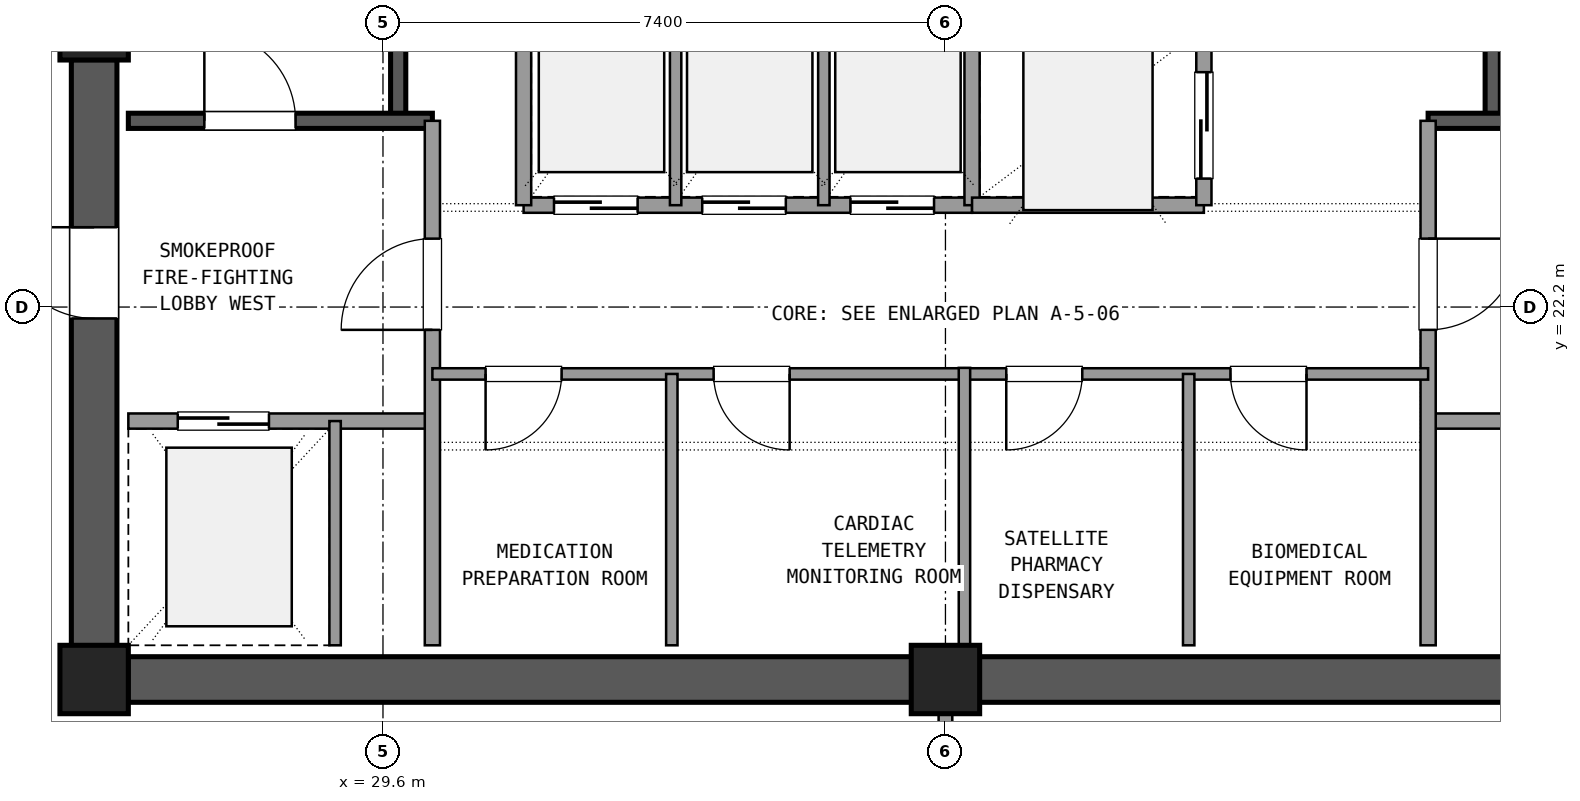
"""IFC4 building model, lengths in metres.
Left out: names, types, materials, properties, quantities, classifications, styles, units other than length and angle.
Written with IfcOpenShell. Run it as: python <this file> out.ifc"""

import sys

from ifc_helpers import new_model, si_unit, direction, frame, frame_2d, origin, origin_2d, place, context, subcontext, project, spatial, rectangle, extrude, element, fill, save


model = new_model("IFC4")
c1 = context("Model", 3, precision=1e-05, world=origin(), true_north=direction((0.0, 1.0)))
c2 = subcontext(c1, "Body", "Model", "MODEL_VIEW")
j1 = project(units=[si_unit("LENGTHUNIT", "METRE"), si_unit("PLANEANGLEUNIT", "RADIAN")], contexts=[c1])
p1 = place(None, origin())
s1 = spatial("IfcSite", under=j1, at=p1, CompositionType="ELEMENT")
p2 = place(p1, origin())
s2 = spatial("IfcBuilding", under=s1, at=p2, CompositionType="ELEMENT")
p3 = place(p2, frame((0.0, 0.0, 203.58)))
s3 = spatial("IfcBuildingStorey", under=s2, at=p3, CompositionType="ELEMENT", Elevation=203.58)
for number, where, z_axis, x_axis in (
    (1, (25.8, 17.3, 0.0), (0.0, 0.0, 1.0), (1.0, 0.0, 0.0)),
    (2, (37.0, 17.3, 0.0), (0.0, 0.0, 1.0), (1.0, 0.0, 0.0)),
    (3, (25.8, 25.9, 0.0), (0.0, 0.0, 1.0), (1.0, 0.0, 0.0)),
):
    element("IfcColumn", number, at=place(p3, frame(where, z_axis=z_axis, x_axis=x_axis)), inside=s3, PredefinedType="COLUMN", context=c2, shape_type="SweptSolid", body=[
        extrude(rectangle(XDim=0.9, YDim=0.9, at=origin_2d()), origin(), (0.0, 0.0, 1.0), 3.6),
    ])
for number, where, z_axis, x_axis in (
    (4, (26.245, 17.3, 0.0), (0.0, 0.0, 1.0), (1.0, 0.0, 0.0)),
    (5, (37.445, 17.3, 0.0), (0.0, 0.0, 1.0), (1.0, 0.0, 0.0)),
):
    element("IfcWall", number, at=place(p3, frame(where, z_axis=z_axis, x_axis=x_axis)), inside=s3, PredefinedType="SHEAR", context=c2, shape_type="SweptSolid", body=[
        extrude(rectangle(XDim=10.31, YDim=0.6, at=frame_2d((5.155, 0.0))), origin(), (0.0, 0.0, 1.0), 3.32),
    ])
p4 = place(p3, frame((25.8, 25.455, 0.0), z_axis=(0.0, 0.0, 1.0), x_axis=(0.0, -1.0, 0.0)))
e6 = element("IfcWall", 6, at=p4, inside=s3, PredefinedType="SHEAR", context=c2, shape_type="SweptSolid", body=[
    extrude(rectangle(XDim=7.71, YDim=0.6, at=frame_2d((3.855, 0.0))), origin(), (0.0, 0.0, 1.0), 3.32),
])
p5 = place(p4, frame((2.205, 0.0, 0.0)))
e7 = element("IfcOpeningElement", 7, at=p5, cuts=e6, PredefinedType="OPENING", context=c2, shape_type="SweptSolid", body=[
    extrude(rectangle(XDim=1.2, YDim=2.15, at=frame_2d((0.6, 1.075))), frame((0.0, 0.31, 0.0), z_axis=(0.0, -1.0, 0.0), x_axis=(1.0, 0.0, 0.0)), (0.0, 0.0, 1.0), 0.62),
])
p6 = place(p3, frame((29.8, 24.65, 0.0), z_axis=(0.0, 0.0, 1.0), x_axis=(0.0, 1.0, 0.0)))
e8 = element("IfcWall", 8, at=p6, inside=s3, PredefinedType="SHEAR", context=c2, shape_type="SweptSolid", body=[
    extrude(rectangle(XDim=9.4, YDim=0.2, at=frame_2d((4.7, 0.0))), origin(), (0.0, 0.0, 1.0), 3.32),
])
p7 = place(p3, frame((26.25, 24.65, 0.0), z_axis=(0.0, 0.0, 1.0), x_axis=(1.0, 0.0, 0.0)))
e9 = element("IfcWall", 9, at=p7, inside=s3, PredefinedType="SHEAR", context=c2, shape_type="SweptSolid", body=[
    extrude(rectangle(XDim=4.0, YDim=0.2, at=frame_2d((2.0, 0.0))), origin(), (0.0, 0.0, 1.0), 3.32),
])
p8 = place(p7, frame((1.0, 0.0, 0.0)))
e10 = element("IfcOpeningElement", 10, at=p8, cuts=e9, PredefinedType="OPENING", context=c2, shape_type="SweptSolid", body=[
    extrude(rectangle(XDim=1.2, YDim=2.15, at=frame_2d((0.6, 1.075))), frame((0.0, 0.11, 0.0), z_axis=(0.0, -1.0, 0.0), x_axis=(1.0, 0.0, 0.0)), (0.0, 0.0, 1.0), 0.22),
])
p9 = place(p3, frame((44.2, 24.65, 0.0), z_axis=(0.0, 0.0, 1.0), x_axis=(0.0, 1.0, 0.0)))
e11 = element("IfcWall", 11, at=p9, inside=s3, PredefinedType="SHEAR", context=c2, shape_type="SweptSolid", body=[
    extrude(rectangle(XDim=9.4, YDim=0.2, at=frame_2d((4.7, 0.0))), origin(), (0.0, 0.0, 1.0), 3.32),
])
p10 = place(p3, frame((43.35, 24.65, 0.0), z_axis=(0.0, 0.0, 1.0), x_axis=(1.0, 0.0, 0.0)))
e12 = element("IfcWall", 12, at=p10, inside=s3, PredefinedType="SHEAR", context=c2, shape_type="SweptSolid", body=[
    extrude(rectangle(XDim=4.4, YDim=0.2, at=frame_2d((2.2, 0.0))), origin(), (0.0, 0.0, 1.0), 3.32),
])
p11 = place(p10, frame((2.0, 0.0, 0.0)))
e13 = element("IfcOpeningElement", 13, at=p11, cuts=e12, PredefinedType="OPENING", context=c2, shape_type="SweptSolid", body=[
    extrude(rectangle(XDim=1.2, YDim=2.15, at=frame_2d((0.6, 1.075))), frame((0.0, 0.11, 0.0), z_axis=(0.0, -1.0, 0.0), x_axis=(1.0, 0.0, 0.0)), (0.0, 0.0, 1.0), 0.22),
])
p12 = place(p3, frame((26.25, 20.7, 0.0), z_axis=(0.0, 0.0, 1.0), x_axis=(1.0, 0.0, 0.0)))
e14 = element("IfcWall", 14, at=p12, inside=s3, PredefinedType="SOLIDWALL", context=c2, shape_type="SweptSolid", body=[
    extrude(rectangle(XDim=4.0, YDim=0.2, at=frame_2d((2.0, 0.0))), origin(), (0.0, 0.0, 1.0), 2.61),
])
p13 = place(p12, frame((0.65, 0.0, 0.0)))
e15 = element("IfcOpeningElement", 15, at=p13, cuts=e14, PredefinedType="OPENING", context=c2, shape_type="SweptSolid", body=[
    extrude(rectangle(XDim=1.2, YDim=2.15, at=frame_2d((0.6, 1.075))), frame((0.0, 0.11, 0.0), z_axis=(0.0, -1.0, 0.0), x_axis=(1.0, 0.0, 0.0)), (0.0, 0.0, 1.0), 0.22),
])
p14 = place(p3, frame((30.25, 17.75, 0.0), z_axis=(0.0, 0.0, 1.0), x_axis=(0.0, 1.0, 0.0)))
e16 = element("IfcWall", 16, at=p14, inside=s3, PredefinedType="SOLIDWALL", context=c2, shape_type="SweptSolid", body=[
    extrude(rectangle(XDim=6.9, YDim=0.2, at=frame_2d((3.45, 0.0))), origin(), (0.0, 0.0, 1.0), 2.61),
])
p15 = place(p14, frame((4.15, 0.0, 0.0)))
e17 = element("IfcOpeningElement", 17, at=p15, cuts=e16, PredefinedType="OPENING", context=c2, shape_type="SweptSolid", body=[
    extrude(rectangle(XDim=1.2, YDim=2.15, at=frame_2d((0.6, 1.075))), frame((0.0, 0.11, 0.0), z_axis=(0.0, -1.0, 0.0), x_axis=(1.0, 0.0, 0.0)), (0.0, 0.0, 1.0), 0.22),
])
p16 = place(p3, frame((28.97, 17.75, 0.0), z_axis=(0.0, 0.0, 1.0), x_axis=(0.0, 1.0, 0.0)))
e18 = element("IfcWall", 18, at=p16, inside=s3, PredefinedType="PARTITIONING", context=c2, shape_type="SweptSolid", body=[
    extrude(rectangle(XDim=2.95, YDim=0.15, at=frame_2d((1.475, 0.0))), origin(), (0.0, 0.0, 1.0), 2.61),
])
p17 = place(p3, frame((43.35, 20.7, 0.0), z_axis=(0.0, 0.0, 1.0), x_axis=(1.0, 0.0, 0.0)))
e19 = element("IfcWall", 19, at=p17, inside=s3, PredefinedType="SOLIDWALL", context=c2, shape_type="SweptSolid", body=[
    extrude(rectangle(XDim=4.4, YDim=0.2, at=frame_2d((2.2, 0.0))), origin(), (0.0, 0.0, 1.0), 2.61),
])
p18 = place(p17, frame((2.35, 0.0, 0.0)))
e20 = element("IfcOpeningElement", 20, at=p18, cuts=e19, PredefinedType="OPENING", context=c2, shape_type="SweptSolid", body=[
    extrude(rectangle(XDim=1.2, YDim=2.15, at=frame_2d((0.6, 1.075))), frame((0.0, 0.11, 0.0), z_axis=(0.0, -1.0, 0.0), x_axis=(1.0, 0.0, 0.0)), (0.0, 0.0, 1.0), 0.22),
])
p19 = place(p3, frame((43.35, 17.75, 0.0), z_axis=(0.0, 0.0, 1.0), x_axis=(0.0, 1.0, 0.0)))
e21 = element("IfcWall", 21, at=p19, inside=s3, PredefinedType="SOLIDWALL", context=c2, shape_type="SweptSolid", body=[
    extrude(rectangle(XDim=6.9, YDim=0.2, at=frame_2d((3.45, 0.0))), origin(), (0.0, 0.0, 1.0), 2.61),
])
p20 = place(p19, frame((4.15, 0.0, 0.0)))
e22 = element("IfcOpeningElement", 22, at=p20, cuts=e21, PredefinedType="OPENING", context=c2, shape_type="SweptSolid", body=[
    extrude(rectangle(XDim=1.2, YDim=2.15, at=frame_2d((0.6, 1.075))), frame((0.0, 0.11, 0.0), z_axis=(0.0, -1.0, 0.0), x_axis=(1.0, 0.0, 0.0)), (0.0, 0.0, 1.0), 0.22),
])
p21 = place(p3, frame((30.25, 21.32, 0.0), z_axis=(0.0, 0.0, 1.0), x_axis=(1.0, 0.0, 0.0)))
e23 = element("IfcWall", 23, at=p21, inside=s3, PredefinedType="PARTITIONING", context=c2, shape_type="SweptSolid", body=[
    extrude(rectangle(XDim=7.0, YDim=0.15, at=frame_2d((3.5, 0.0))), origin(), (0.0, 0.0, 1.0), 2.61),
])
p22 = place(p21, frame((0.7, 0.0, 0.0)))
e24 = element("IfcOpeningElement", 24, at=p22, cuts=e23, PredefinedType="OPENING", context=c2, shape_type="SweptSolid", body=[
    extrude(rectangle(XDim=1.0, YDim=2.15, at=frame_2d((0.5, 1.075))), frame((0.0, 0.085, 0.0), z_axis=(0.0, -1.0, 0.0), x_axis=(1.0, 0.0, 0.0)), (0.0, 0.0, 1.0), 0.17),
])
p23 = place(p21, frame((3.7, 0.0, 0.0)))
e25 = element("IfcOpeningElement", 25, at=p23, cuts=e23, PredefinedType="OPENING", context=c2, shape_type="SweptSolid", body=[
    extrude(rectangle(XDim=1.0, YDim=2.15, at=frame_2d((0.5, 1.075))), frame((0.0, 0.085, 0.0), z_axis=(0.0, -1.0, 0.0), x_axis=(1.0, 0.0, 0.0)), (0.0, 0.0, 1.0), 0.17),
])
p24 = place(p3, frame((33.4, 17.75, 0.0), z_axis=(0.0, 0.0, 1.0), x_axis=(0.0, 1.0, 0.0)))
e26 = element("IfcWall", 26, at=p24, inside=s3, PredefinedType="PARTITIONING", context=c2, shape_type="SweptSolid", body=[
    extrude(rectangle(XDim=3.57, YDim=0.15, at=frame_2d((1.785, 0.0))), origin(), (0.0, 0.0, 1.0), 2.61),
])
p25 = place(p3, frame((37.25, 21.32, 0.0), z_axis=(0.0, 0.0, 1.0), x_axis=(1.0, 0.0, 0.0)))
e27 = element("IfcWall", 27, at=p25, inside=s3, PredefinedType="PARTITIONING", context=c2, shape_type="SweptSolid", body=[
    extrude(rectangle(XDim=6.1, YDim=0.15, at=frame_2d((3.05, 0.0))), origin(), (0.0, 0.0, 1.0), 2.61),
])
p26 = place(p25, frame((0.55, 0.0, 0.0)))
e28 = element("IfcOpeningElement", 28, at=p26, cuts=e27, PredefinedType="OPENING", context=c2, shape_type="SweptSolid", body=[
    extrude(rectangle(XDim=1.0, YDim=2.15, at=frame_2d((0.5, 1.075))), frame((0.0, 0.085, 0.0), z_axis=(0.0, -1.0, 0.0), x_axis=(1.0, 0.0, 0.0)), (0.0, 0.0, 1.0), 0.17),
])
p27 = place(p25, frame((3.5, 0.0, 0.0)))
e29 = element("IfcOpeningElement", 29, at=p27, cuts=e27, PredefinedType="OPENING", context=c2, shape_type="SweptSolid", body=[
    extrude(rectangle(XDim=1.0, YDim=2.15, at=frame_2d((0.5, 1.075))), frame((0.0, 0.085, 0.0), z_axis=(0.0, -1.0, 0.0), x_axis=(1.0, 0.0, 0.0)), (0.0, 0.0, 1.0), 0.17),
])
p28 = place(p3, frame((40.2, 17.75, 0.0), z_axis=(0.0, 0.0, 1.0), x_axis=(0.0, 1.0, 0.0)))
e30 = element("IfcWall", 30, at=p28, inside=s3, PredefinedType="PARTITIONING", context=c2, shape_type="SweptSolid", body=[
    extrude(rectangle(XDim=3.57, YDim=0.15, at=frame_2d((1.785, 0.0))), origin(), (0.0, 0.0, 1.0), 2.61),
])
p29 = place(p3, frame((37.25, 17.75, 0.0), z_axis=(0.0, 0.0, 1.0), x_axis=(0.0, 1.0, 0.0)))
e31 = element("IfcWall", 31, at=p29, inside=s3, PredefinedType="PARTITIONING", context=c2, shape_type="SweptSolid", body=[
    extrude(rectangle(XDim=3.65, YDim=0.15, at=frame_2d((1.825, 0.0))), origin(), (0.0, 0.0, 1.0), 2.61),
])
p30 = place(p3, frame((31.45, 23.54, 0.0), z_axis=(0.0, 0.0, 1.0), x_axis=(1.0, 0.0, 0.0)))
e32 = element("IfcWall", 32, at=p30, inside=s3, PredefinedType="SOLIDWALL", context=c2, shape_type="SweptSolid", body=[
    extrude(rectangle(XDim=5.9, YDim=0.2, at=frame_2d((2.95, 0.0))), origin(), (0.0, 0.0, 1.0), 2.61),
])
p31 = place(p30, frame((0.4, 0.0, 0.0)))
e33 = element("IfcOpeningElement", 33, at=p31, cuts=e32, PredefinedType="OPENING", context=c2, shape_type="SweptSolid", body=[
    extrude(rectangle(XDim=1.1, YDim=2.15, at=frame_2d((0.55, 1.075))), frame((0.0, 0.11, 0.0), z_axis=(0.0, -1.0, 0.0), x_axis=(1.0, 0.0, 0.0)), (0.0, 0.0, 1.0), 0.22),
])
p32 = place(p30, frame((2.35, 0.0, 0.0)))
e34 = element("IfcOpeningElement", 34, at=p32, cuts=e32, PredefinedType="OPENING", context=c2, shape_type="SweptSolid", body=[
    extrude(rectangle(XDim=1.1, YDim=2.15, at=frame_2d((0.55, 1.075))), frame((0.0, 0.11, 0.0), z_axis=(0.0, -1.0, 0.0), x_axis=(1.0, 0.0, 0.0)), (0.0, 0.0, 1.0), 0.22),
])
p33 = place(p30, frame((4.3, 0.0, 0.0)))
e35 = element("IfcOpeningElement", 35, at=p33, cuts=e32, PredefinedType="OPENING", context=c2, shape_type="SweptSolid", body=[
    extrude(rectangle(XDim=1.1, YDim=2.15, at=frame_2d((0.55, 1.075))), frame((0.0, 0.11, 0.0), z_axis=(0.0, -1.0, 0.0), x_axis=(1.0, 0.0, 0.0)), (0.0, 0.0, 1.0), 0.22),
])
p34 = place(p3, frame((31.45, 23.54, 0.0), z_axis=(0.0, 0.0, 1.0), x_axis=(0.0, 1.0, 0.0)))
e36 = element("IfcWall", 36, at=p34, inside=s3, PredefinedType="SOLIDWALL", context=c2, shape_type="SweptSolid", body=[
    extrude(rectangle(XDim=2.81, YDim=0.2, at=frame_2d((1.405, 0.0))), origin(), (0.0, 0.0, 1.0), 2.61),
])
for number, where, z_axis, x_axis in (
    (37, (33.45, 23.54, 0.0), (0.0, 0.0, 1.0), (0.0, 1.0, 0.0)),
    (38, (35.4, 23.54, 0.0), (0.0, 0.0, 1.0), (0.0, 1.0, 0.0)),
):
    element("IfcWall", number, at=place(p3, frame(where, z_axis=z_axis, x_axis=x_axis)), inside=s3, PredefinedType="PARTITIONING", context=c2, shape_type="SweptSolid", body=[
        extrude(rectangle(XDim=2.81, YDim=0.15, at=frame_2d((1.405, 0.0))), origin(), (0.0, 0.0, 1.0), 2.61),
    ])
p35 = place(p3, frame((37.35, 23.54, 0.0), z_axis=(0.0, 0.0, 1.0), x_axis=(0.0, 1.0, 0.0)))
e39 = element("IfcWall", 39, at=p35, inside=s3, PredefinedType="SOLIDWALL", context=c2, shape_type="SweptSolid", body=[
    extrude(rectangle(XDim=6.82, YDim=0.2, at=frame_2d((3.41, 0.0))), origin(), (0.0, 0.0, 1.0), 2.61),
])
p36 = place(p3, frame((37.35, 23.54, 0.0), z_axis=(0.0, 0.0, 1.0), x_axis=(1.0, 0.0, 0.0)))
e40 = element("IfcWall", 40, at=p36, inside=s3, PredefinedType="SOLIDWALL", context=c2, shape_type="SweptSolid", body=[
    extrude(rectangle(XDim=3.05, YDim=0.2, at=frame_2d((1.525, 0.0))), origin(), (0.0, 0.0, 1.0), 2.61),
])
p37 = place(p3, frame((40.4, 23.54, 0.0), z_axis=(0.0, 0.0, 1.0), x_axis=(0.0, 1.0, 0.0)))
e41 = element("IfcWall", 41, at=p37, inside=s3, PredefinedType="SOLIDWALL", context=c2, shape_type="SweptSolid", body=[
    extrude(rectangle(XDim=6.82, YDim=0.2, at=frame_2d((3.41, 0.0))), origin(), (0.0, 0.0, 1.0), 2.61),
])
p38 = place(p37, frame((0.35, 0.0, 0.0)))
e42 = element("IfcOpeningElement", 42, at=p38, cuts=e41, PredefinedType="OPENING", context=c2, shape_type="SweptSolid", body=[
    extrude(rectangle(XDim=1.4, YDim=2.2, at=frame_2d((0.7, 1.1))), frame((0.0, 0.11, 0.0), z_axis=(0.0, -1.0, 0.0), x_axis=(1.0, 0.0, 0.0)), (0.0, 0.0, 1.0), 0.22),
])
p39 = place(p37, frame((2.65, 0.0, 0.0)))
e43 = element("IfcOpeningElement", 43, at=p39, cuts=e41, PredefinedType="OPENING", context=c2, shape_type="SweptSolid", body=[
    extrude(rectangle(XDim=1.4, YDim=2.2, at=frame_2d((0.7, 1.1))), frame((0.0, 0.11, 0.0), z_axis=(0.0, -1.0, 0.0), x_axis=(1.0, 0.0, 0.0)), (0.0, 0.0, 1.0), 0.22),
])
p40 = place(p37, frame((4.85, 0.0, 0.0)))
e44 = element("IfcOpeningElement", 44, at=p40, cuts=e41, PredefinedType="OPENING", context=c2, shape_type="SweptSolid", body=[
    extrude(rectangle(XDim=1.4, YDim=2.2, at=frame_2d((0.7, 1.1))), frame((0.0, 0.11, 0.0), z_axis=(0.0, -1.0, 0.0), x_axis=(1.0, 0.0, 0.0)), (0.0, 0.0, 1.0), 0.22),
])
p41 = place(p3, frame((37.0, 14.15, 0.0), z_axis=(0.0, 0.0, 1.0), x_axis=(0.0, 1.0, 0.0)))
e45 = element("IfcWall", 45, at=p41, inside=s3, PredefinedType="PARTITIONING", context=c2, shape_type="SweptSolid", body=[
    extrude(rectangle(XDim=2.7, YDim=0.18, at=frame_2d((1.35, 0.0))), origin(), (0.0, 0.0, 1.0), 2.61),
])
p42 = place(p41, frame((0.35, 0.0, 0.0)))
e46 = element("IfcOpeningElement", 46, at=p42, cuts=e45, PredefinedType="OPENING", context=c2, shape_type="SweptSolid", body=[
    extrude(rectangle(XDim=2.0, YDim=2.2, at=frame_2d((1.0, 1.1))), frame((0.0, 0.1, 0.0), z_axis=(0.0, -1.0, 0.0), x_axis=(1.0, 0.0, 0.0)), (0.0, 0.0, 1.0), 0.2),
])
p43 = place(p8, origin())
e47 = element("IfcDoor", 47, at=p43, inside=s3, OperationType="SINGLE_SWING_LEFT", PredefinedType="DOOR", context=c2, shape_type="SweptSolid", body=[
    extrude(rectangle(XDim=1.2, YDim=2.15, at=frame_2d((0.6, 1.075))), frame((0.0, 0.025, 0.0), z_axis=(0.0, -1.0, 0.0), x_axis=(1.0, 0.0, 0.0)), (0.0, 0.0, 1.0), 0.05),
])
fill(e10, e47)
p44 = place(p13, origin())
e48 = element("IfcDoor", 48, at=p44, inside=s3, OperationType="SLIDING_TO_LEFT", PredefinedType="DOOR", context=c2, shape_type="SweptSolid", body=[
    extrude(rectangle(XDim=1.2, YDim=2.15, at=frame_2d((0.6, 1.075))), frame((0.0, 0.025, 0.0), z_axis=(0.0, -1.0, 0.0), x_axis=(1.0, 0.0, 0.0)), (0.0, 0.0, 1.0), 0.05),
])
fill(e15, e48)
p45 = place(p15, origin())
e49 = element("IfcDoor", 49, at=p45, inside=s3, OperationType="SINGLE_SWING_LEFT", PredefinedType="DOOR", context=c2, shape_type="SweptSolid", body=[
    extrude(rectangle(XDim=1.2, YDim=2.15, at=frame_2d((0.6, 1.075))), frame((0.0, 0.025, 0.0), z_axis=(0.0, -1.0, 0.0), x_axis=(1.0, 0.0, 0.0)), (0.0, 0.0, 1.0), 0.05),
])
fill(e17, e49)
p46 = place(p20, frame((1.2, 0.0, 0.0), z_axis=(0.0, 0.0, 1.0), x_axis=(-1.0, 0.0, 0.0)))
e50 = element("IfcDoor", 50, at=p46, inside=s3, OperationType="SINGLE_SWING_RIGHT", PredefinedType="DOOR", context=c2, shape_type="SweptSolid", body=[
    extrude(rectangle(XDim=1.2, YDim=2.15, at=frame_2d((0.6, 1.075))), frame((0.0, 0.025, 0.0), z_axis=(0.0, -1.0, 0.0), x_axis=(1.0, 0.0, 0.0)), (0.0, 0.0, 1.0), 0.05),
])
fill(e22, e50)
p47 = place(p5, frame((1.2, 0.0, 0.0), z_axis=(0.0, 0.0, 1.0), x_axis=(-1.0, 0.0, 0.0)))
e51 = element("IfcDoor", 51, at=p47, inside=s3, OperationType="SINGLE_SWING_LEFT", PredefinedType="DOOR", context=c2, shape_type="SweptSolid", body=[
    extrude(rectangle(XDim=1.2, YDim=2.15, at=frame_2d((0.6, 1.075))), frame((0.0, 0.025, 0.0), z_axis=(0.0, -1.0, 0.0), x_axis=(1.0, 0.0, 0.0)), (0.0, 0.0, 1.0), 0.05),
])
fill(e7, e51)
p48 = place(p22, frame((1.0, 0.0, 0.0), z_axis=(0.0, 0.0, 1.0), x_axis=(-1.0, 0.0, 0.0)))
e52 = element("IfcDoor", 52, at=p48, inside=s3, OperationType="SINGLE_SWING_LEFT", PredefinedType="DOOR", context=c2, shape_type="SweptSolid", body=[
    extrude(rectangle(XDim=1.0, YDim=2.15, at=frame_2d((0.5, 1.075))), frame((0.0, 0.025, 0.0), z_axis=(0.0, -1.0, 0.0), x_axis=(1.0, 0.0, 0.0)), (0.0, 0.0, 1.0), 0.05),
])
fill(e24, e52)
p49 = place(p23, frame((1.0, 0.0, 0.0), z_axis=(0.0, 0.0, 1.0), x_axis=(-1.0, 0.0, 0.0)))
e53 = element("IfcDoor", 53, at=p49, inside=s3, OperationType="SINGLE_SWING_RIGHT", PredefinedType="DOOR", context=c2, shape_type="SweptSolid", body=[
    extrude(rectangle(XDim=1.0, YDim=2.15, at=frame_2d((0.5, 1.075))), frame((0.0, 0.025, 0.0), z_axis=(0.0, -1.0, 0.0), x_axis=(1.0, 0.0, 0.0)), (0.0, 0.0, 1.0), 0.05),
])
fill(e25, e53)
p50 = place(p26, frame((1.0, 0.0, 0.0), z_axis=(0.0, 0.0, 1.0), x_axis=(-1.0, 0.0, 0.0)))
e54 = element("IfcDoor", 54, at=p50, inside=s3, OperationType="SINGLE_SWING_LEFT", PredefinedType="DOOR", context=c2, shape_type="SweptSolid", body=[
    extrude(rectangle(XDim=1.0, YDim=2.15, at=frame_2d((0.5, 1.075))), frame((0.0, 0.025, 0.0), z_axis=(0.0, -1.0, 0.0), x_axis=(1.0, 0.0, 0.0)), (0.0, 0.0, 1.0), 0.05),
])
fill(e28, e54)
p51 = place(p27, frame((1.0, 0.0, 0.0), z_axis=(0.0, 0.0, 1.0), x_axis=(-1.0, 0.0, 0.0)))
e55 = element("IfcDoor", 55, at=p51, inside=s3, OperationType="SINGLE_SWING_RIGHT", PredefinedType="DOOR", context=c2, shape_type="SweptSolid", body=[
    extrude(rectangle(XDim=1.0, YDim=2.15, at=frame_2d((0.5, 1.075))), frame((0.0, 0.025, 0.0), z_axis=(0.0, -1.0, 0.0), x_axis=(1.0, 0.0, 0.0)), (0.0, 0.0, 1.0), 0.05),
])
fill(e29, e55)
p52 = place(p31, origin())
e56 = element("IfcDoor", 56, at=p52, inside=s3, OperationType="SLIDING_TO_RIGHT", PredefinedType="DOOR", context=c2, shape_type="SweptSolid", body=[
    extrude(rectangle(XDim=1.1, YDim=2.15, at=frame_2d((0.55, 1.075))), frame((0.0, 0.025, 0.0), z_axis=(0.0, -1.0, 0.0), x_axis=(1.0, 0.0, 0.0)), (0.0, 0.0, 1.0), 0.05),
])
fill(e33, e56)
p53 = place(p32, origin())
e57 = element("IfcDoor", 57, at=p53, inside=s3, OperationType="SLIDING_TO_RIGHT", PredefinedType="DOOR", context=c2, shape_type="SweptSolid", body=[
    extrude(rectangle(XDim=1.1, YDim=2.15, at=frame_2d((0.55, 1.075))), frame((0.0, 0.025, 0.0), z_axis=(0.0, -1.0, 0.0), x_axis=(1.0, 0.0, 0.0)), (0.0, 0.0, 1.0), 0.05),
])
fill(e34, e57)
p54 = place(p33, origin())
e58 = element("IfcDoor", 58, at=p54, inside=s3, OperationType="SLIDING_TO_RIGHT", PredefinedType="DOOR", context=c2, shape_type="SweptSolid", body=[
    extrude(rectangle(XDim=1.1, YDim=2.15, at=frame_2d((0.55, 1.075))), frame((0.0, 0.025, 0.0), z_axis=(0.0, -1.0, 0.0), x_axis=(1.0, 0.0, 0.0)), (0.0, 0.0, 1.0), 0.05),
])
fill(e35, e58)
p55 = place(p38, origin())
e59 = element("IfcDoor", 59, at=p55, inside=s3, OperationType="SLIDING_TO_LEFT", PredefinedType="DOOR", context=c2, shape_type="SweptSolid", body=[
    extrude(rectangle(XDim=1.4, YDim=2.2, at=frame_2d((0.7, 1.1))), frame((0.0, 0.025, 0.0), z_axis=(0.0, -1.0, 0.0), x_axis=(1.0, 0.0, 0.0)), (0.0, 0.0, 1.0), 0.05),
])
fill(e42, e59)
save(model, sys.argv[1])
